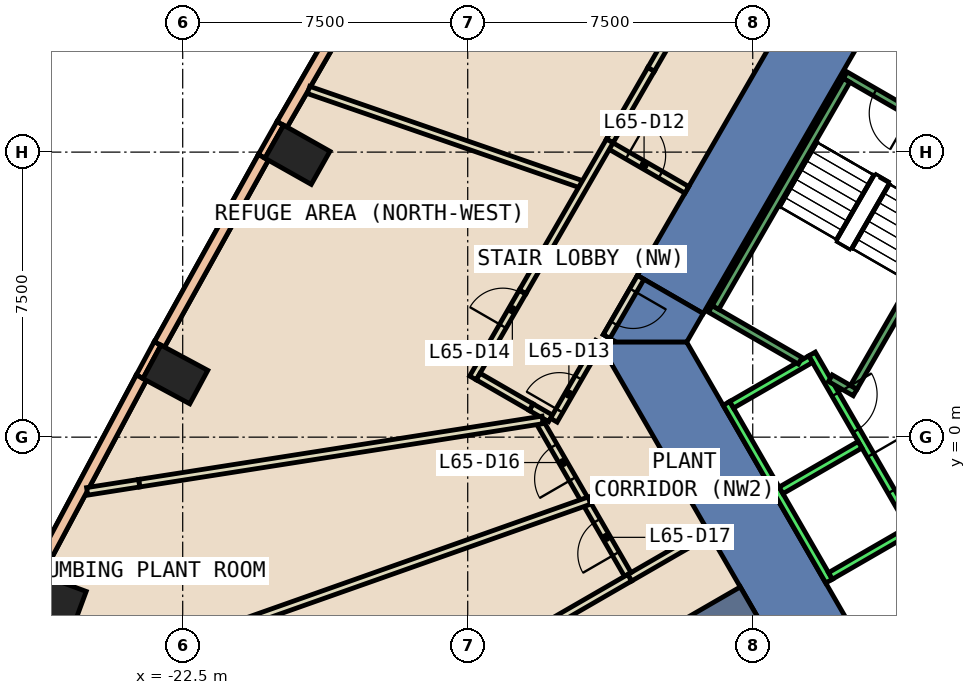
"""IFC4 building model, lengths in metres.
Left out: names, types, materials, properties, quantities, classifications, styles, units other than length and angle.
Written with IfcOpenShell. Run it as: python <this file> out.ifc"""

import sys

from ifc_helpers import new_model, si_unit, direction, frame, frame_2d, origin, origin_2d, place, context, subcontext, project, spatial, polyline, rectangle, outline, extrude, element, fill, save


model = new_model("IFC4")
c1 = context("Model", 3, precision=1e-05, world=origin(), true_north=direction((0.0, 1.0)))
c2 = subcontext(c1, "Body", "Model", "MODEL_VIEW")
j1 = project(units=[si_unit("LENGTHUNIT", "METRE"), si_unit("PLANEANGLEUNIT", "RADIAN")], contexts=[c1])
p1 = place(None, origin())
s1 = spatial("IfcSite", under=j1, at=p1, CompositionType="ELEMENT")
p2 = place(p1, origin())
s2 = spatial("IfcBuilding", under=s1, at=p2, CompositionType="ELEMENT")
p3 = place(p2, frame((0.0, 0.0, 281.0)))
s3 = spatial("IfcBuildingStorey", under=s2, at=p3, CompositionType="ELEMENT", Elevation=281.0)
for number, where, z_axis, x_axis in (
    (1, (-19.481, 7.43, -0.6), (0.0, 0.0, 1.0), (0.491, 0.871, 0.0)),
    (2, (-22.693, 1.649, -0.6), (0.0, 0.0, 1.0), (0.474, 0.881, 0.0)),
    (3, (-25.869, -4.285, -0.6), (0.0, 0.0, 1.0), (0.347, 0.938, 0.0)),
):
    element("IfcColumn", number, at=place(p3, frame(where, z_axis=z_axis, x_axis=x_axis)), inside=s3, PredefinedType="COLUMN", context=c2, shape_type="SweptSolid", body=[
        extrude(rectangle(XDim=1.0, YDim=1.4, at=origin_2d()), origin(), (0.0, 0.0, 1.0), 5.4),
    ])
p4 = place(p3, frame((0.0, 0.0, -0.6)))
e4 = element("IfcWall", 4, at=p4, inside=s3, PredefinedType="SHEAR", context=c2, shape_type="SweptSolid", body=[
    extrude(outline(polyline([(-10.535, 4.253), (-8.803, 3.253), (-4.619, 10.5), (-5.774, 12.5), (-10.535, 4.253)])), origin(), (0.0, 0.0, 1.0), 5.4),
])
p5 = place(p3, frame((0.0, 0.0, 3.6)))
e5 = element("IfcWall", 5, at=p5, inside=s3, PredefinedType="SHEAR", context=c2, shape_type="SweptSolid", body=[
    extrude(outline(polyline([(-11.432, 2.699), (-11.088, 2.5), (-9.238, 2.5), (-8.803, 3.253), (-10.535, 4.253), (-11.432, 2.699)])), origin(), (0.0, 0.0, 1.0), 1.2),
])
p6 = place(p3, frame((0.0, 0.0, -0.6)))
e6 = element("IfcWall", 6, at=p6, inside=s3, PredefinedType="SHEAR", context=c2, shape_type="SweptSolid", body=[
    extrude(outline(polyline([(-11.547, 2.5), (-5.774, -7.5), (-4.619, -5.5), (-9.238, 2.5), (-11.547, 2.5)])), origin(), (0.0, 0.0, 1.0), 5.4),
])
p7 = place(p3, frame((-7.578, -4.375, 0.0), z_axis=(0.0, 0.0, 1.0), x_axis=(-0.866020754303, -0.500008053052, 0.0)))
e7 = element("IfcWall", 7, at=p7, inside=s3, PredefinedType="SHEAR", context=c2, shape_type="SweptSolid", body=[
    extrude(rectangle(XDim=20.374, YDim=1.0, at=frame_2d((10.187, 0.0))), origin(), (0.0, 0.0, 1.0), 4.8),
])
for number, where, z_axis, x_axis in (
    (8, (-19.932, 8.258, 0.0), (0.0, 0.0, 1.0), (-0.492, -0.871, 0.0)),
    (9, (-23.16, 2.469, 0.0), (0.0, 0.0, 1.0), (-0.474, -0.881, 0.0)),
):
    element("IfcWall", number, at=place(p3, frame(where, z_axis=z_axis, x_axis=x_axis)), inside=s3, PredefinedType="STANDARD", context=c2, shape_type="SweptSolid", body=[
        extrude(rectangle(XDim=1.0, YDim=0.2, at=frame_2d((0.5, 0.0))), origin(), (0.0, 0.0, 1.0), 4.8),
    ])
p8 = place(p3, frame((-17.07, 13.106, 0.0), z_axis=(0.0, 0.0, 1.0), x_axis=(-0.49997269499, -0.866041167766, 0.0)))
e10 = element("IfcWall", 10, at=p8, inside=s3, PredefinedType="STANDARD", context=c2, shape_type="SweptSolid", body=[
    extrude(rectangle(XDim=5.63, YDim=0.3, at=frame_2d((2.815, 0.0))), origin(), (0.0, 0.0, 1.0), 1.2),
])
p9 = place(p3, frame((-17.07, 13.106, 4.0), z_axis=(0.0, 0.0, 1.0), x_axis=(-0.49997269499, -0.866041167766, 0.0)))
e11 = element("IfcWall", 11, at=p9, inside=s3, PredefinedType="STANDARD", context=c2, shape_type="SweptSolid", body=[
    extrude(rectangle(XDim=5.63, YDim=0.3, at=frame_2d((2.815, 0.0))), origin(), (0.0, 0.0, 1.0), 0.8),
])
p10 = place(p3, frame((-20.377, 7.362, 0.0), z_axis=(0.0, 0.0, 1.0), x_axis=(-0.485665023555, -0.874145002214, 0.0)))
e12 = element("IfcWall", 12, at=p10, inside=s3, PredefinedType="STANDARD", context=c2, shape_type="SweptSolid", body=[
    extrude(rectangle(XDim=5.63, YDim=0.3, at=frame_2d((2.815, 0.0))), origin(), (0.0, 0.0, 1.0), 1.2),
])
p11 = place(p3, frame((-20.377, 7.362, 4.0), z_axis=(0.0, 0.0, 1.0), x_axis=(-0.485665023555, -0.874145002214, 0.0)))
e13 = element("IfcWall", 13, at=p11, inside=s3, PredefinedType="STANDARD", context=c2, shape_type="SweptSolid", body=[
    extrude(rectangle(XDim=5.63, YDim=0.3, at=frame_2d((2.815, 0.0))), origin(), (0.0, 0.0, 1.0), 0.8),
])
p12 = place(p3, frame((-23.588, 1.565, 0.0), z_axis=(0.0, 0.0, 1.0), x_axis=(-0.470796778214, -0.882241686628, 0.0)))
e14 = element("IfcWall", 14, at=p12, inside=s3, PredefinedType="STANDARD", context=c2, shape_type="SweptSolid", body=[
    extrude(rectangle(XDim=5.833, YDim=0.3, at=frame_2d((2.917, 0.0))), origin(), (0.0, 0.0, 1.0), 1.2),
])
p13 = place(p3, frame((-23.588, 1.565, 4.0), z_axis=(0.0, 0.0, 1.0), x_axis=(-0.470796778214, -0.882241686628, 0.0)))
e15 = element("IfcWall", 15, at=p13, inside=s3, PredefinedType="STANDARD", context=c2, shape_type="SweptSolid", body=[
    extrude(rectangle(XDim=5.833, YDim=0.3, at=frame_2d((2.917, 0.0))), origin(), (0.0, 0.0, 1.0), 0.8),
])
p14 = place(p3, frame((-8.66, -2.5, 0.0), z_axis=(0.0, 0.0, 1.0), x_axis=(-0.866100915363, -0.499869187296, 0.0)))
e16 = element("IfcWall", 16, at=p14, inside=s3, PredefinedType="PARTITIONING", context=c2, shape_type="SweptSolid", body=[
    extrude(rectangle(XDim=2.401, YDim=0.2, at=frame_2d((1.2, 0.0))), origin(), (0.0, 0.0, 1.0), 4.8),
])
p15 = place(p3, frame((-11.312, 7.707, 0.0), z_axis=(0.0, 0.0, 1.0), x_axis=(0.865999212041, -0.500045362686, 0.0)))
e17 = element("IfcWall", 17, at=p15, inside=s3, PredefinedType="PARTITIONING", context=c2, shape_type="SweptSolid", body=[
    extrude(rectangle(XDim=2.4, YDim=0.2, at=frame_2d((1.2, 0.0))), origin(), (0.0, 0.0, 1.0), 4.8),
])
p16 = place(p15, frame((0.6, 0.0, 0.0)))
e18 = element("IfcOpeningElement", 18, at=p16, cuts=e17, PredefinedType="OPENING", context=c2, shape_type="SweptSolid", body=[
    extrude(rectangle(XDim=1.0, YDim=2.1, at=frame_2d((0.5, 1.05))), frame((0.0, 0.11, 0.0), z_axis=(0.0, -1.0, 0.0), x_axis=(1.0, 0.0, 0.0)), (0.0, 0.0, 1.0), 0.22),
])
p17 = place(p3, frame((-13.331, 0.789, 0.0), z_axis=(0.0, 0.0, 1.0), x_axis=(0.866399552997, -0.499351393877, 0.0)))
e19 = element("IfcWall", 19, at=p17, inside=s3, PredefinedType="PARTITIONING", context=c2, shape_type="SweptSolid", body=[
    extrude(rectangle(XDim=0.589, YDim=0.2, at=frame_2d((0.294, 0.0))), origin(), (0.0, 0.0, 1.0), 4.8),
])
p18 = place(p3, frame((-12.734, 0.445, 0.0), z_axis=(0.0, 0.0, 1.0), x_axis=(0.500083740326, 0.865977050886, 0.0)))
e20 = element("IfcWall", 20, at=p18, inside=s3, PredefinedType="PARTITIONING", context=c2, shape_type="SweptSolid", body=[
    extrude(rectangle(XDim=2.203, YDim=0.2, at=frame_2d((1.102, 0.0))), origin(), (0.0, 0.0, 1.0), 4.8),
])
p19 = place(p18, frame((0.292, 0.0, 0.0)))
e21 = element("IfcOpeningElement", 21, at=p19, cuts=e20, PredefinedType="OPENING", context=c2, shape_type="SweptSolid", body=[
    extrude(rectangle(XDim=1.0, YDim=2.1, at=frame_2d((0.5, 1.05))), frame((0.0, 0.11, 0.0), z_axis=(0.0, -1.0, 0.0), x_axis=(1.0, 0.0, 0.0)), (0.0, 0.0, 1.0), 0.22),
])
p20 = place(p3, frame((-14.862, 1.558, 0.0), z_axis=(0.0, 0.0, 1.0), x_axis=(0.499929606556, 0.866066041644, 0.0)))
e22 = element("IfcWall", 22, at=p20, inside=s3, PredefinedType="PARTITIONING", context=c2, shape_type="SweptSolid", body=[
    extrude(rectangle(XDim=2.619, YDim=0.2, at=frame_2d((1.309, 0.0))), origin(), (0.0, 0.0, 1.0), 4.8),
])
p21 = place(p20, frame((1.573, 0.0, 0.0)))
e23 = element("IfcOpeningElement", 23, at=p21, cuts=e22, PredefinedType="OPENING", context=c2, shape_type="SweptSolid", body=[
    extrude(rectangle(XDim=1.0, YDim=2.1, at=frame_2d((0.5, 1.05))), frame((0.0, 0.11, 0.0), z_axis=(0.0, -1.0, 0.0), x_axis=(1.0, 0.0, 0.0)), (0.0, 0.0, 1.0), 0.22),
])
p22 = place(p3, frame((-13.331, 0.79, 0.0), z_axis=(0.0, 0.0, 1.0), x_axis=(-0.866003733444, 0.500037532253, 0.0)))
e24 = element("IfcWall", 24, at=p22, inside=s3, PredefinedType="PARTITIONING", context=c2, shape_type="SweptSolid", body=[
    extrude(rectangle(XDim=1.61, YDim=0.2, at=frame_2d((0.805, 0.0))), origin(), (0.0, 0.0, 1.0), 4.8),
])
p23 = place(p3, frame((-11.262, 7.794, 0.0), z_axis=(0.0, 0.0, 1.0), x_axis=(0.500049485622, 0.865996831362, 0.0)))
e25 = element("IfcWall", 25, at=p23, inside=s3, PredefinedType="PARTITIONING", context=c2, shape_type="SweptSolid", body=[
    extrude(rectangle(XDim=2.176, YDim=0.2, at=frame_2d((1.088, 0.0))), origin(), (0.0, 0.0, 1.0), 4.8),
])
p24 = place(p3, frame((-11.893, -1.702, 0.0), z_axis=(0.0, 0.0, 1.0), x_axis=(-0.499941887998, 0.866058952165, 0.0)))
e26 = element("IfcWall", 26, at=p24, inside=s3, PredefinedType="PARTITIONING", context=c2, shape_type="SweptSolid", body=[
    extrude(rectangle(XDim=2.472, YDim=0.2, at=frame_2d((1.236, 0.0))), origin(), (0.0, 0.0, 1.0), 4.8),
])
p25 = place(p24, frame((0.694, 0.0, 0.0)))
e27 = element("IfcOpeningElement", 27, at=p25, cuts=e26, PredefinedType="OPENING", context=c2, shape_type="SweptSolid", body=[
    extrude(rectangle(XDim=1.0, YDim=2.1, at=frame_2d((0.5, 1.05))), frame((0.0, 0.11, 0.0), z_axis=(0.0, -1.0, 0.0), x_axis=(1.0, 0.0, 0.0)), (0.0, 0.0, 1.0), 0.22),
])
p26 = place(p3, frame((-10.789, -3.613, 0.0), z_axis=(0.0, 0.0, 1.0), x_axis=(-0.500207565094, 0.865905532852, 0.0)))
e28 = element("IfcWall", 28, at=p26, inside=s3, PredefinedType="PARTITIONING", context=c2, shape_type="SweptSolid", body=[
    extrude(rectangle(XDim=2.207, YDim=0.2, at=frame_2d((1.104, 0.0))), origin(), (0.0, 0.0, 1.0), 4.8),
])
p27 = place(p26, frame((0.628, 0.0, 0.0)))
e29 = element("IfcOpeningElement", 29, at=p27, cuts=e28, PredefinedType="OPENING", context=c2, shape_type="SweptSolid", body=[
    extrude(rectangle(XDim=1.0, YDim=2.1, at=frame_2d((0.5, 1.05))), frame((0.0, 0.11, 0.0), z_axis=(0.0, -1.0, 0.0), x_axis=(1.0, 0.0, 0.0)), (0.0, 0.0, 1.0), 0.22),
])
p28 = place(p3, frame((-19.189, 9.136, 0.0), z_axis=(0.0, 0.0, 1.0), x_axis=(0.94508965871, -0.326811164129, 0.0)))
e30 = element("IfcWall", 30, at=p28, inside=s3, PredefinedType="PARTITIONING", context=c2, shape_type="SweptSolid", body=[
    extrude(rectangle(XDim=7.674, YDim=0.2, at=frame_2d((3.837, 0.0))), origin(), (0.0, 0.0, 1.0), 4.8),
])
p29 = place(p3, frame((-13.03, 0.454, 0.0), z_axis=(0.0, 0.0, 1.0), x_axis=(-0.987908611797, -0.155037333369, 0.0)))
e31 = element("IfcWall", 31, at=p29, inside=s3, PredefinedType="PARTITIONING", context=c2, shape_type="SweptSolid", body=[
    extrude(rectangle(XDim=10.746, YDim=0.2, at=frame_2d((5.373, 0.0))), origin(), (0.0, 0.0, 1.0), 4.8),
])
p30 = place(p3, frame((-11.798, -1.669, 0.0), z_axis=(0.0, 0.0, 1.0), x_axis=(-0.942869217573, -0.333163081018, 0.0)))
e32 = element("IfcWall", 32, at=p30, inside=s3, PredefinedType="PARTITIONING", context=c2, shape_type="SweptSolid", body=[
    extrude(rectangle(XDim=16.829, YDim=0.2, at=frame_2d((8.415, 0.0))), origin(), (0.0, 0.0, 1.0), 4.8),
])
p31 = place(p3, frame((-10.449, 4.203, 0.0), z_axis=(0.0, 0.0, 1.0), x_axis=(-0.499914839587, -0.866074565589, 0.0)))
e33 = element("IfcWall", 33, at=p31, inside=s3, PredefinedType="PARTITIONING", context=c2, shape_type="SweptSolid", body=[
    extrude(rectangle(XDim=1.794, YDim=0.2, at=frame_2d((0.897, 0.0))), origin(), (0.0, 0.0, 1.0), 2.4),
])
p32 = place(p31, frame((0.397, 0.0, 0.0)))
e34 = element("IfcOpeningElement", 34, at=p32, cuts=e33, PredefinedType="OPENING", context=c2, shape_type="SweptSolid", body=[
    extrude(rectangle(XDim=1.0, YDim=2.1, at=frame_2d((0.5, 1.05))), frame((0.0, 0.11, 0.0), z_axis=(0.0, -1.0, 0.0), x_axis=(1.0, 0.0, 0.0)), (0.0, 0.0, 1.0), 0.22),
])
p33 = place(p3, frame((-26.331, -12.702, 0.0), z_axis=(0.0, 0.0, 1.0), x_axis=(0.866028192525, 0.499995169729, 0.0)))
e35 = element("IfcWall", 35, at=p33, inside=s3, PredefinedType="PARTITIONING", context=c2, shape_type="SweptSolid", body=[
    extrude(rectangle(XDim=18.004, YDim=0.2, at=frame_2d((9.002, 0.0))), origin(), (0.0, 0.0, 1.0), 4.8),
])
p34 = place(p3, frame((-11.632, 2.353, 0.0), z_axis=(0.0, 0.0, 1.0), x_axis=(0.5004692653, 0.865754303766, 0.0)))
e36 = element("IfcWall", 36, at=p34, inside=s3, PredefinedType="PARTITIONING", context=c2, shape_type="SweptSolid", body=[
    extrude(rectangle(XDim=0.17, YDim=0.2, at=frame_2d((0.085, 0.0))), origin(), (0.0, 0.0, 1.0), 2.4),
])
p35 = place(p3, frame((-13.553, 3.826, 0.0), z_axis=(0.0, 0.0, 1.0), x_axis=(0.500242919407, 0.865885108766, 0.0)))
e37 = element("IfcWall", 37, at=p35, inside=s3, PredefinedType="PARTITIONING", context=c2, shape_type="SweptSolid", body=[
    extrude(rectangle(XDim=1.056, YDim=0.2, at=frame_2d((0.528, 0.0))), origin(), (0.0, 0.0, 1.0), 2.4),
])
p36 = place(p3, frame((-13.025, 4.74, 0.0), z_axis=(0.0, 0.0, 1.0), x_axis=(0.499944203502, 0.866057615511, 0.0)))
e38 = element("IfcWall", 38, at=p36, inside=s3, PredefinedType="PARTITIONING", context=c2, shape_type="SweptSolid", body=[
    extrude(rectangle(XDim=3.526, YDim=0.2, at=frame_2d((1.763, 0.0))), origin(), (0.0, 0.0, 1.0), 4.8),
])
p37 = place(p3, frame((-10.174, 9.678, 0.0), z_axis=(0.0, 0.0, 1.0), x_axis=(0.49960161538, 0.866255289109, 0.0)))
e39 = element("IfcWall", 39, at=p37, inside=s3, PredefinedType="PARTITIONING", context=c2, shape_type="SweptSolid", body=[
    extrude(rectangle(XDim=0.933, YDim=0.2, at=frame_2d((0.466, 0.0))), origin(), (0.0, 0.0, 1.0), 2.4),
])
p38 = place(p3, frame((-23.646, -1.212, 0.0), z_axis=(0.0, 0.0, 1.0), x_axis=(-0.987862829639, -0.155328779745, 0.0)))
e40 = element("IfcWall", 40, at=p38, inside=s3, PredefinedType="PARTITIONING", context=c2, shape_type="SweptSolid", body=[
    extrude(rectangle(XDim=1.385, YDim=0.2, at=frame_2d((0.692, 0.0))), origin(), (0.0, 0.0, 1.0), 2.4),
])
p39 = place(p3, frame((-5.94, 2.188, 0.0), z_axis=(0.0, 0.0, 1.0), x_axis=(0.500034260056, -0.866005622828, 0.0)))
e41 = element("IfcWall", 41, at=p39, inside=s3, PredefinedType="STANDARD", context=c2, shape_type="SweptSolid", body=[
    extrude(rectangle(XDim=5.399, YDim=0.2, at=frame_2d((2.7, 0.0))), origin(), (0.0, 0.0, 1.0), 4.8),
])
p40 = place(p39, frame((3.075, 0.0, 0.0)))
e42 = element("IfcOpeningElement", 42, at=p40, cuts=e41, PredefinedType="OPENING", context=c2, shape_type="SweptSolid", body=[
    extrude(rectangle(XDim=1.1, YDim=2.1, at=frame_2d((0.55, 1.05))), frame((0.0, 0.11, 0.0), z_axis=(0.0, -1.0, 0.0), x_axis=(1.0, 0.0, 0.0)), (0.0, 0.0, 1.0), 0.22),
])
p41 = place(p39, frame((1.225, 0.0, 0.0)))
e43 = element("IfcOpeningElement", 43, at=p41, cuts=e41, PredefinedType="OPENING", context=c2, shape_type="SweptSolid", body=[
    extrude(rectangle(XDim=1.1, YDim=2.1, at=frame_2d((0.55, 1.05))), frame((0.0, 0.11, 0.0), z_axis=(0.0, -1.0, 0.0), x_axis=(1.0, 0.0, 0.0)), (0.0, 0.0, 1.0), 0.22),
])
p42 = place(p3, frame((-8.192, 0.888, 0.0), z_axis=(0.0, 0.0, 1.0), x_axis=(0.500034260056, -0.866005622828, 0.0)))
e44 = element("IfcWall", 44, at=p42, inside=s3, PredefinedType="STANDARD", context=c2, shape_type="SweptSolid", body=[
    extrude(rectangle(XDim=5.399, YDim=0.2, at=frame_2d((2.7, 0.0))), origin(), (0.0, 0.0, 1.0), 4.8),
])
for number, where, z_axis, x_axis in (
    (45, (-5.977, 2.052, 0.0), (0.0, 0.0, 1.0), (-0.866, -0.5, 0.0)),
    (46, (-4.677, -0.2, 0.0), (0.0, 0.0, 1.0), (-0.866, -0.5, 0.0)),
):
    element("IfcWall", number, at=place(p3, frame(where, z_axis=z_axis, x_axis=x_axis)), inside=s3, PredefinedType="STANDARD", context=c2, shape_type="SweptSolid", body=[
        extrude(rectangle(XDim=2.399, YDim=0.2, at=frame_2d((1.2, 0.0))), origin(), (0.0, 0.0, 1.0), 4.8),
    ])
p43 = place(p3, frame((-3.377, -2.452, 0.0), z_axis=(0.0, 0.0, 1.0), x_axis=(-0.865955154139, -0.50012165622, 0.0)))
e47 = element("IfcWall", 47, at=p43, inside=s3, PredefinedType="STANDARD", context=c2, shape_type="SweptSolid", body=[
    extrude(rectangle(XDim=2.4, YDim=0.2, at=frame_2d((1.2, 0.0))), origin(), (0.0, 0.0, 1.0), 4.8),
])
p44 = place(p3, frame((-1.256, 7.324, 0.0), z_axis=(0.0, 0.0, 1.0), x_axis=(-0.866046073146, 0.499964197906, 0.0)))
e48 = element("IfcWall", 48, at=p44, inside=s3, PredefinedType="STANDARD", context=c2, shape_type="SweptSolid", body=[
    extrude(rectangle(XDim=4.4, YDim=0.2, at=frame_2d((2.2, 0.0))), origin(), (0.0, 0.0, 1.0), 4.8),
])
p45 = place(p44, frame((2.4, 0.0, 0.0)))
e49 = element("IfcOpeningElement", 49, at=p45, cuts=e48, PredefinedType="OPENING", context=c2, shape_type="SweptSolid", body=[
    extrude(rectangle(XDim=1.1, YDim=2.2, at=frame_2d((0.55, 1.1))), frame((0.0, 0.11, 0.0), z_axis=(0.0, -1.0, 0.0), x_axis=(1.0, 0.0, 0.0)), (0.0, 0.0, 1.0), 0.22),
])
p46 = place(p3, frame((-6.25, 2.01, 0.0), z_axis=(0.0, 0.0, 1.0), x_axis=(-0.86611865017, 0.499838457731, 0.0)))
e50 = element("IfcWall", 50, at=p46, inside=s3, PredefinedType="STANDARD", context=c2, shape_type="SweptSolid", body=[
    extrude(rectangle(XDim=2.733, YDim=0.2, at=frame_2d((1.366, 0.0))), origin(), (0.0, 0.0, 1.0), 4.8),
])
p47 = place(p3, frame((-4.806, 1.176, 0.0), z_axis=(0.0, 0.0, 1.0), x_axis=(-0.866558586415, 0.499075361355, 0.0)))
e51 = element("IfcWall", 51, at=p47, inside=s3, PredefinedType="STANDARD", context=c2, shape_type="SweptSolid", body=[
    extrude(rectangle(XDim=0.751, YDim=0.2, at=frame_2d((0.376, 0.0))), origin(), (0.0, 0.0, 1.0), 4.8),
])
p48 = place(p3, frame((-1.393, 7.288, 0.0), z_axis=(0.0, 0.0, 1.0), x_axis=(-0.499963383562, -0.866046543262, 0.0)))
e52 = element("IfcWall", 52, at=p48, inside=s3, PredefinedType="STANDARD", context=c2, shape_type="SweptSolid", body=[
    extrude(rectangle(XDim=6.9, YDim=0.2, at=frame_2d((3.45, 0.0))), origin(), (0.0, 0.0, 1.0), 4.8),
])
p49 = place(p48, frame((0.45, 0.0, 0.0)))
e53 = element("IfcOpeningElement", 53, at=p49, cuts=e52, PredefinedType="OPENING", context=c2, shape_type="SweptSolid", body=[
    extrude(rectangle(XDim=1.1, YDim=2.2, at=frame_2d((0.55, 1.1))), frame((0.0, 0.11, 0.0), z_axis=(0.0, -1.0, 0.0), x_axis=(1.0, 0.0, 0.0)), (0.0, 0.0, 1.0), 0.22),
])
p50 = place(p3, frame((-5.03, 9.388, 0.0), z_axis=(0.0, 0.0, 1.0), x_axis=(-0.499978703459, -0.866037698999, 0.0)))
e54 = element("IfcWall", 54, at=p50, inside=s3, PredefinedType="STANDARD", context=c2, shape_type="SweptSolid", body=[
    extrude(rectangle(XDim=6.9, YDim=0.2, at=frame_2d((3.45, 0.0))), origin(), (0.0, 0.0, 1.0), 4.8),
])
p51 = place(p16, origin())
e55 = element("IfcDoor", 55, at=p51, inside=s3, OperationType="SINGLE_SWING_LEFT", PredefinedType="DOOR", context=c2, shape_type="SweptSolid", body=[
    extrude(rectangle(XDim=1.0, YDim=2.1, at=frame_2d((0.5, 1.05))), frame((0.0, 0.025, 0.0), z_axis=(0.0, -1.0, 0.0), x_axis=(1.0, 0.0, 0.0)), (0.0, 0.0, 1.0), 0.05),
])
fill(e18, e55)
p52 = place(p19, origin())
e56 = element("IfcDoor", 56, at=p52, inside=s3, OperationType="SINGLE_SWING_RIGHT", PredefinedType="DOOR", context=c2, shape_type="SweptSolid", body=[
    extrude(rectangle(XDim=1.0, YDim=2.1, at=frame_2d((0.5, 1.05))), frame((0.0, 0.025, 0.0), z_axis=(0.0, -1.0, 0.0), x_axis=(1.0, 0.0, 0.0)), (0.0, 0.0, 1.0), 0.05),
])
fill(e21, e56)
p53 = place(p21, origin())
e57 = element("IfcDoor", 57, at=p53, inside=s3, OperationType="SINGLE_SWING_LEFT", PredefinedType="DOOR", context=c2, shape_type="SweptSolid", body=[
    extrude(rectangle(XDim=1.0, YDim=2.1, at=frame_2d((0.5, 1.05))), frame((0.0, 0.025, 0.0), z_axis=(0.0, -1.0, 0.0), x_axis=(1.0, 0.0, 0.0)), (0.0, 0.0, 1.0), 0.05),
])
fill(e23, e57)
p54 = place(p25, origin())
e58 = element("IfcDoor", 58, at=p54, inside=s3, OperationType="SINGLE_SWING_LEFT", PredefinedType="DOOR", context=c2, shape_type="SweptSolid", body=[
    extrude(rectangle(XDim=1.0, YDim=2.1, at=frame_2d((0.5, 1.05))), frame((0.0, 0.025, 0.0), z_axis=(0.0, -1.0, 0.0), x_axis=(1.0, 0.0, 0.0)), (0.0, 0.0, 1.0), 0.05),
])
fill(e27, e58)
p55 = place(p27, origin())
e59 = element("IfcDoor", 59, at=p55, inside=s3, OperationType="SINGLE_SWING_RIGHT", PredefinedType="DOOR", context=c2, shape_type="SweptSolid", body=[
    extrude(rectangle(XDim=1.0, YDim=2.1, at=frame_2d((0.5, 1.05))), frame((0.0, 0.025, 0.0), z_axis=(0.0, -1.0, 0.0), x_axis=(1.0, 0.0, 0.0)), (0.0, 0.0, 1.0), 0.05),
])
fill(e29, e59)
p56 = place(p32, origin())
e60 = element("IfcDoor", 60, at=p56, inside=s3, OperationType="SINGLE_SWING_LEFT", PredefinedType="DOOR", context=c2, shape_type="SweptSolid", body=[
    extrude(rectangle(XDim=1.0, YDim=2.1, at=frame_2d((0.5, 1.05))), frame((0.0, 0.025, 0.0), z_axis=(0.0, -1.0, 0.0), x_axis=(1.0, 0.0, 0.0)), (0.0, 0.0, 1.0), 0.05),
])
fill(e34, e60)
p57 = place(p40, origin())
e61 = element("IfcDoor", 61, at=p57, inside=s3, OperationType="SLIDING_TO_LEFT", PredefinedType="DOOR", context=c2, shape_type="SweptSolid", body=[
    extrude(rectangle(XDim=1.1, YDim=2.1, at=frame_2d((0.55, 1.05))), frame((0.0, 0.025, 0.0), z_axis=(0.0, -1.0, 0.0), x_axis=(1.0, 0.0, 0.0)), (0.0, 0.0, 1.0), 0.05),
])
fill(e42, e61)
p58 = place(p41, origin())
e62 = element("IfcDoor", 62, at=p58, inside=s3, OperationType="SLIDING_TO_LEFT", PredefinedType="DOOR", context=c2, shape_type="SweptSolid", body=[
    extrude(rectangle(XDim=1.1, YDim=2.1, at=frame_2d((0.55, 1.05))), frame((0.0, 0.025, 0.0), z_axis=(0.0, -1.0, 0.0), x_axis=(1.0, 0.0, 0.0)), (0.0, 0.0, 1.0), 0.05),
])
fill(e43, e62)
p59 = place(p45, origin())
e63 = element("IfcDoor", 63, at=p59, inside=s3, OperationType="SINGLE_SWING_LEFT", PredefinedType="DOOR", context=c2, shape_type="SweptSolid", body=[
    extrude(rectangle(XDim=1.1, YDim=2.2, at=frame_2d((0.55, 1.1))), frame((0.0, 0.025, 0.0), z_axis=(0.0, -1.0, 0.0), x_axis=(1.0, 0.0, 0.0)), (0.0, 0.0, 1.0), 0.05),
])
fill(e49, e63)
save(model, sys.argv[1])
